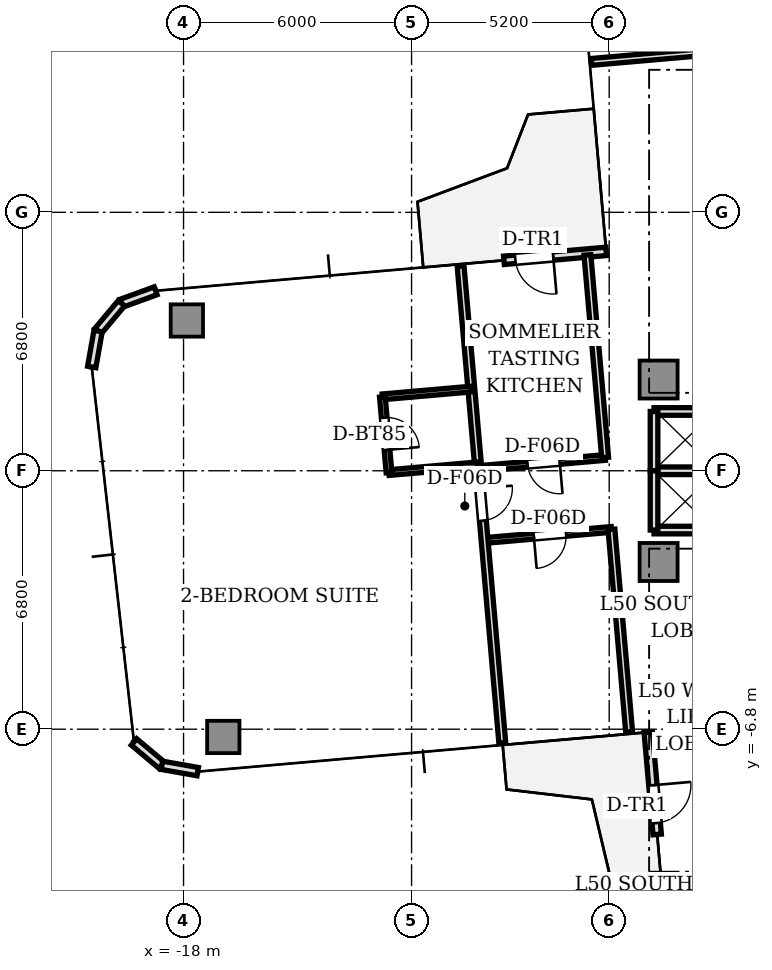
"""IFC4 building model, lengths in metres.
Left out: names, types, materials, properties, quantities, classifications, styles, units other than length and angle.
Written with IfcOpenShell. Run it as: python <this file> out.ifc"""

import sys

from ifc_helpers import new_model, si_unit, direction, frame, frame_2d, origin, origin_2d, place, context, subcontext, project, spatial, rectangle, extrude, source, transform, mapped, element, fill, save


model = new_model("IFC4")
c1 = context("Model", 3, precision=1e-05, world=origin(), true_north=direction((0.0, 1.0)))
c2 = subcontext(c1, "Body", "Model", "MODEL_VIEW")
j1 = project(units=[si_unit("LENGTHUNIT", "METRE"), si_unit("PLANEANGLEUNIT", "RADIAN")], contexts=[c1])
p1 = place(None, origin())
s1 = spatial("IfcSite", under=j1, at=p1, CompositionType="ELEMENT")
p2 = place(p1, origin())
s2 = spatial("IfcBuilding", under=s1, at=p2, CompositionType="ELEMENT")
p3 = place(p2, frame((0.0, 0.0, 181.9)))
s3 = spatial("IfcBuildingStorey", under=s2, at=p3, CompositionType="ELEMENT", Elevation=181.9)
m1 = source(origin(), c2, "Body", "SweptSolid", [
    extrude(rectangle(XDim=1.0, YDim=1.0, at=origin_2d()), origin(), (0.0, 0.0, 1.0), 3.11),
])
for number, where, z_axis, x_axis in (
    (1, (-5.5, 2.4, 0.0), (0.0, 0.0, 1.0), (1.0, 0.0, 0.0)),
    (2, (-5.5, -2.4, 0.0), (0.0, 0.0, 1.0), (1.0, 0.0, 0.0)),
):
    element("IfcColumn", number, at=place(p3, frame(where, z_axis=z_axis, x_axis=x_axis)), inside=s3, PredefinedType="COLUMN", context=c2, shape_type="MappedRepresentation", body=[
        mapped(m1, transform((0.0, 0.0, 0.0), scale=1.0)),
    ])
m2 = source(origin(), c2, "Body", "SweptSolid", [
    extrude(rectangle(XDim=0.85, YDim=0.85, at=origin_2d()), origin(), (0.0, 0.0, 1.0), 3.11),
])
for number, where, z_axis, x_axis in (
    (3, (-17.913, 3.954, 0.0), (0.0, 0.0, 1.0), (1.0, 0.0, 0.0)),
    (4, (-16.954, -7.004, 0.0), (0.0, 0.0, 1.0), (1.0, 0.0, 0.0)),
):
    element("IfcColumn", number, at=place(p3, frame(where, z_axis=z_axis, x_axis=x_axis)), inside=s3, PredefinedType="COLUMN", context=c2, shape_type="MappedRepresentation", body=[
        mapped(m2, transform((0.0, 0.0, 0.0), scale=1.0)),
    ])
p4 = place(p3, frame((-6.879, 5.772, 0.0), z_axis=(0.0, 0.0, 1.0), x_axis=(-0.996193619346, -0.087168071984, 0.0)))
e5 = element("IfcWall", 5, at=p4, inside=s3, PredefinedType="STANDARD", context=c2, shape_type="SweptSolid", body=[
    extrude(rectangle(XDim=2.7, YDim=0.22, at=frame_2d((1.35, 0.0))), origin(), (0.0, 0.0, 1.0), 3.11),
])
p5 = place(p4, frame((1.4, 0.0, 0.0)))
e6 = element("IfcOpeningElement", 6, at=p5, cuts=e5, PredefinedType="OPENING", context=c2, shape_type="SweptSolid", body=[
    extrude(rectangle(XDim=1.0, YDim=2.2, at=frame_2d((0.5, 1.1))), frame((0.0, 0.12, 0.0), z_axis=(0.0, -1.0, 0.0), x_axis=(1.0, 0.0, 0.0)), (0.0, 0.0, 1.0), 0.24),
])
p6 = place(p3, frame((-18.734, 4.735, 0.0), z_axis=(0.0, 0.0, 1.0), x_axis=(-0.939741306239, -0.34188635151, 0.0)))
e7 = element("IfcWall", 7, at=p6, inside=s3, PredefinedType="STANDARD", context=c2, shape_type="SweptSolid", body=[
    extrude(rectangle(XDim=0.958, YDim=0.22, at=frame_2d((0.479, 0.0))), origin(), (0.0, 0.0, 1.0), 3.11),
])
for number, where, z_axis, x_axis in (
    (8, (-19.634, 4.408, 0.0), (0.0, 0.0, 1.0), (-0.643, -0.766, 0.0)),
    (9, (-20.25, 3.674, 0.0), (0.0, 0.0, 1.0), (-0.174, -0.985, 0.0)),
):
    element("IfcWall", number, at=place(p3, frame(where, z_axis=z_axis, x_axis=x_axis)), inside=s3, PredefinedType="STANDARD", context=c2, shape_type="SweptSolid", body=[
        extrude(rectangle(XDim=0.958, YDim=0.22, at=frame_2d((0.479, 0.0))), origin(), (0.0, 0.0, 1.0), 3.11),
    ])
p7 = place(p3, frame((-19.304, -7.135, 0.0), z_axis=(0.0, 0.0, 1.0), x_axis=(0.766001159887, -0.642839189107, 0.0)))
e10 = element("IfcWall", 10, at=p7, inside=s3, PredefinedType="STANDARD", context=c2, shape_type="SweptSolid", body=[
    extrude(rectangle(XDim=0.958, YDim=0.22, at=frame_2d((0.479, 0.0))), origin(), (0.0, 0.0, 1.0), 3.11),
])
p8 = place(p3, frame((-18.57, -7.75, 0.0), z_axis=(0.0, 0.0, 1.0), x_axis=(0.984770724397, -0.173858046606, 0.0)))
e11 = element("IfcWall", 11, at=p8, inside=s3, PredefinedType="STANDARD", context=c2, shape_type="SweptSolid", body=[
    extrude(rectangle(XDim=0.958, YDim=0.22, at=frame_2d((0.479, 0.0))), origin(), (0.0, 0.0, 1.0), 3.11),
])
p9 = place(p3, frame((-5.772, -6.879, 0.0), z_axis=(0.0, 0.0, 1.0), x_axis=(0.087168071984, -0.996193619346, 0.0)))
e12 = element("IfcWall", 12, at=p9, inside=s3, PredefinedType="STANDARD", context=c2, shape_type="SweptSolid", body=[
    extrude(rectangle(XDim=2.7, YDim=0.22, at=frame_2d((1.35, 0.0))), origin(), (0.0, 0.0, 1.0), 3.11),
])
p10 = place(p9, frame((1.4, 0.0, 0.0)))
e13 = element("IfcOpeningElement", 13, at=p10, cuts=e12, PredefinedType="OPENING", context=c2, shape_type="SweptSolid", body=[
    extrude(rectangle(XDim=1.0, YDim=2.2, at=frame_2d((0.5, 1.1))), frame((0.0, 0.12, 0.0), z_axis=(0.0, -1.0, 0.0), x_axis=(1.0, 0.0, 0.0)), (0.0, 0.0, 1.0), 0.24),
])
for number, where, z_axis, x_axis in (
    (14, (-5.62, 1.56, 0.0), (0.0, 0.0, 1.0), (1.0, 0.0, 0.0)),
    (15, (-5.62, -1.56, 0.0), (0.0, 0.0, 1.0), (1.0, 0.0, 0.0)),
    (16, (-5.62, 0.0, 0.0), (0.0, 0.0, 1.0), (1.0, 0.0, 0.0)),
):
    element("IfcWall", number, at=place(p3, frame(where, z_axis=z_axis, x_axis=x_axis)), inside=s3, PredefinedType="SOLIDWALL", context=c2, shape_type="SweptSolid", body=[
        extrude(rectangle(XDim=1.64, YDim=0.2, at=frame_2d((0.82, 0.0))), origin(), (0.0, 0.0, 1.0), 2.66),
    ])
for number, where, z_axis, x_axis in (
    (17, (-5.62, 0.0, 0.0), (0.0, 0.0, 1.0), (0.0, 1.0, 0.0)),
    (18, (-5.62, -1.56, 0.0), (0.0, 0.0, 1.0), (0.0, 1.0, 0.0)),
):
    element("IfcWall", number, at=place(p3, frame(where, z_axis=z_axis, x_axis=x_axis)), inside=s3, PredefinedType="SOLIDWALL", context=c2, shape_type="SweptSolid", body=[
        extrude(rectangle(XDim=1.56, YDim=0.2, at=frame_2d((0.78, 0.0))), origin(), (0.0, 0.0, 1.0), 2.66),
    ])
p11 = place(p3, frame((-1.936, 11.224, 0.0), z_axis=(0.0, 0.0, 1.0), x_axis=(-0.996194212812, -0.087161289348, 0.0)))
e19 = element("IfcWall", 19, at=p11, inside=s3, PredefinedType="PARTITIONING", context=c2, shape_type="SweptSolid", body=[
    extrude(rectangle(XDim=5.35, YDim=0.18, at=frame_2d((2.675, 0.0))), origin(), (0.0, 0.0, 1.0), 2.66),
])
p12 = place(p3, frame((-6.741, -1.543, 0.0), z_axis=(0.0, 0.0, 1.0), x_axis=(-0.996193954812, -0.087164238054, 0.0)))
e20 = element("IfcWall", 20, at=p12, inside=s3, PredefinedType="PARTITIONING", context=c2, shape_type="SweptSolid", body=[
    extrude(rectangle(XDim=3.35, YDim=0.15, at=frame_2d((1.675, 0.0))), origin(), (0.0, 0.0, 1.0), 2.66),
])
p13 = place(p12, frame((1.2, 0.0, 0.0)))
e21 = element("IfcOpeningElement", 21, at=p13, cuts=e20, PredefinedType="OPENING", context=c2, shape_type="SweptSolid", body=[
    extrude(rectangle(XDim=0.85, YDim=2.1, at=frame_2d((0.425, 1.05))), frame((0.0, 0.085, 0.0), z_axis=(0.0, -1.0, 0.0), x_axis=(1.0, 0.0, 0.0)), (0.0, 0.0, 1.0), 0.17),
])
p14 = place(p3, frame((-6.907, 0.349, 0.0), z_axis=(0.0, 0.0, 1.0), x_axis=(-0.996193954812, -0.087164238054, 0.0)))
e22 = element("IfcWall", 22, at=p14, inside=s3, PredefinedType="PARTITIONING", context=c2, shape_type="SweptSolid", body=[
    extrude(rectangle(XDim=3.35, YDim=0.15, at=frame_2d((1.675, 0.0))), origin(), (0.0, 0.0, 1.0), 2.66),
])
p15 = place(p14, frame((1.2, 0.0, 0.0)))
e23 = element("IfcOpeningElement", 23, at=p15, cuts=e22, PredefinedType="OPENING", context=c2, shape_type="SweptSolid", body=[
    extrude(rectangle(XDim=0.85, YDim=2.1, at=frame_2d((0.425, 1.05))), frame((0.0, 0.085, 0.0), z_axis=(0.0, -1.0, 0.0), x_axis=(1.0, 0.0, 0.0)), (0.0, 0.0, 1.0), 0.17),
])
for number, where, z_axis, x_axis in (
    (24, (-6.741, -1.543, 0.0), (0.0, 0.0, 1.0), (0.087, -0.996, 0.0)),
    (25, (-7.373, 5.679, 0.0), (0.0, 0.0, 1.0), (0.087, -0.996, 0.0)),
):
    element("IfcWall", number, at=place(p3, frame(where, z_axis=z_axis, x_axis=x_axis)), inside=s3, PredefinedType="PARTITIONING", context=c2, shape_type="SweptSolid", body=[
        extrude(rectangle(XDim=5.35, YDim=0.18, at=frame_2d((2.675, 0.0))), origin(), (0.0, 0.0, 1.0), 2.66),
    ])
p16 = place(p3, frame((-10.71, 5.387, 0.0), z_axis=(0.0, 0.0, 1.0), x_axis=(0.087154691724, -0.996194790044, 0.0)))
e26 = element("IfcWall", 26, at=p16, inside=s3, PredefinedType="PARTITIONING", context=c2, shape_type="SweptSolid", body=[
    extrude(rectangle(XDim=12.6, YDim=0.18, at=frame_2d((6.3, 0.0))), origin(), (0.0, 0.0, 1.0), 2.66),
])
p17 = place(p16, frame((5.875, 0.0, 0.0)))
e27 = element("IfcOpeningElement", 27, at=p17, cuts=e26, PredefinedType="OPENING", context=c2, shape_type="SweptSolid", body=[
    extrude(rectangle(XDim=0.85, YDim=2.1, at=frame_2d((0.425, 1.05))), frame((0.0, 0.1, 0.0), z_axis=(0.0, -1.0, 0.0), x_axis=(1.0, 0.0, 0.0)), (0.0, 0.0, 1.0), 0.2),
])
for number, where, z_axis, x_axis in (
    (28, (-10.253, 0.157, 0.0), (0.0, 0.0, 1.0), (-0.996, -0.087, 0.0)),
    (29, (-10.427, 2.149, 0.0), (0.0, 0.0, 1.0), (-0.996, -0.087, 0.0)),
):
    element("IfcWall", number, at=place(p3, frame(where, z_axis=z_axis, x_axis=x_axis)), inside=s3, PredefinedType="PARTITIONING", context=c2, shape_type="SweptSolid", body=[
        extrude(rectangle(XDim=2.35, YDim=0.15, at=frame_2d((1.175, 0.0))), origin(), (0.0, 0.0, 1.0), 2.66),
    ])
p18 = place(p3, frame((-12.768, 1.945, 0.0), z_axis=(0.0, 0.0, 1.0), x_axis=(0.087156350505, -0.99619464492, 0.0)))
e30 = element("IfcWall", 30, at=p18, inside=s3, PredefinedType="PARTITIONING", context=c2, shape_type="SweptSolid", body=[
    extrude(rectangle(XDim=2.0, YDim=0.15, at=frame_2d((1.0, 0.0))), origin(), (0.0, 0.0, 1.0), 2.66),
])
p19 = place(p18, frame((0.55, 0.0, 0.0)))
e31 = element("IfcOpeningElement", 31, at=p19, cuts=e30, PredefinedType="OPENING", context=c2, shape_type="SweptSolid", body=[
    extrude(rectangle(XDim=0.85, YDim=2.1, at=frame_2d((0.425, 1.05))), frame((0.0, 0.085, 0.0), z_axis=(0.0, -1.0, 0.0), x_axis=(1.0, 0.0, 0.0)), (0.0, 0.0, 1.0), 0.17),
])
m3 = source(origin(), c2, "Body", "SweptSolid", [
    extrude(rectangle(XDim=1.0, YDim=0.05, at=origin_2d()), origin(), (0.0, 0.0, 1.0), 2.2),
])
p20 = place(p5, frame((0.5, 0.0, 0.0)))
e32 = element("IfcDoor", 32, at=p20, inside=s3, OperationType="SINGLE_SWING_LEFT", PredefinedType="DOOR", context=c2, shape_type="MappedRepresentation", body=[
    mapped(m3, transform((0.0, 0.0, 0.0), scale=1.0)),
])
fill(e6, e32)
p21 = place(p10, frame((0.5, 0.0, 0.0)))
e33 = element("IfcDoor", 33, at=p21, inside=s3, OperationType="SINGLE_SWING_LEFT", PredefinedType="DOOR", context=c2, shape_type="MappedRepresentation", body=[
    mapped(m3, transform((0.0, 0.0, 0.0), scale=1.0)),
])
fill(e13, e33)
m4 = source(origin(), c2, "Body", "SweptSolid", [
    extrude(rectangle(XDim=0.85, YDim=0.05, at=origin_2d()), origin(), (0.0, 0.0, 1.0), 2.1),
])
p22 = place(p13, frame((0.425, 0.0, 0.0)))
e34 = element("IfcDoor", 34, at=p22, inside=s3, OperationType="SINGLE_SWING_RIGHT", PredefinedType="DOOR", context=c2, shape_type="MappedRepresentation", body=[
    mapped(m4, transform((0.0, 0.0, 0.0), scale=1.0)),
])
fill(e21, e34)
p23 = place(p15, frame((0.425, 0.0, 0.0)))
e35 = element("IfcDoor", 35, at=p23, inside=s3, OperationType="SINGLE_SWING_LEFT", PredefinedType="DOOR", context=c2, shape_type="MappedRepresentation", body=[
    mapped(m4, transform((0.0, 0.0, 0.0), scale=1.0)),
])
fill(e23, e35)
p24 = place(p19, frame((0.425, 0.0, 0.0)))
e36 = element("IfcDoor", 36, at=p24, inside=s3, OperationType="SINGLE_SWING_RIGHT", PredefinedType="DOOR", context=c2, shape_type="MappedRepresentation", body=[
    mapped(m4, transform((0.0, 0.0, 0.0), scale=1.0)),
])
fill(e31, e36)
p25 = place(p17, frame((0.425, 0.0, 0.0)))
e37 = element("IfcDoor", 37, at=p25, inside=s3, OperationType="SINGLE_SWING_LEFT", PredefinedType="DOOR", context=c2, shape_type="MappedRepresentation", body=[
    mapped(m4, transform((0.0, 0.0, 0.0), scale=1.0)),
])
fill(e27, e37)
save(model, sys.argv[1])
